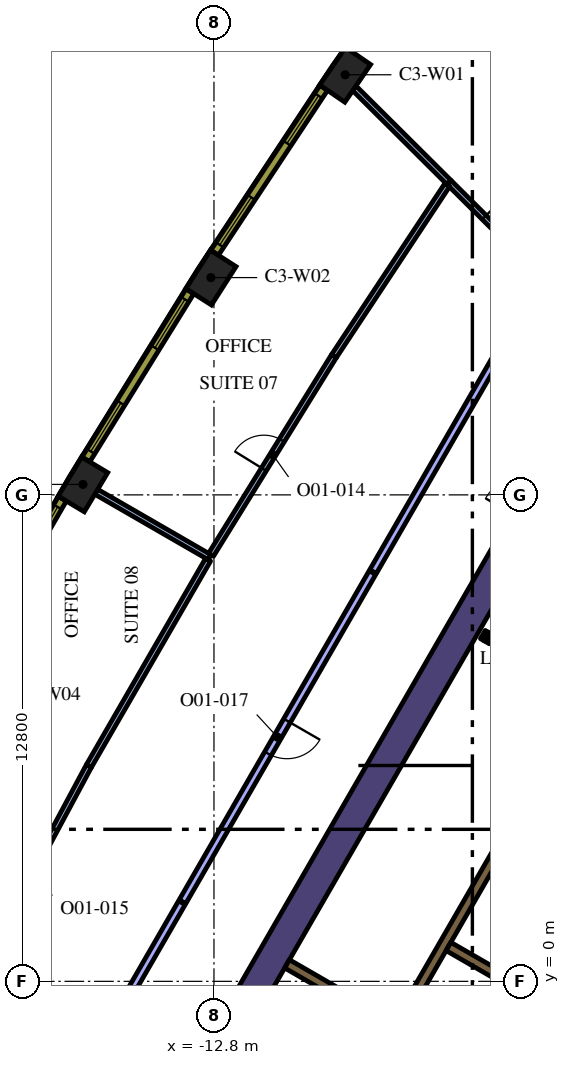
"""IFC4 building model, lengths in metres.
Left out: names, types, materials, properties, quantities, classifications, styles, units other than length and angle.
Written with IfcOpenShell. Run it as: python <this file> out.ifc"""

import sys

from ifc_helpers import new_model, si_unit, direction, frame, frame_2d, origin, origin_2d, place, context, subcontext, project, spatial, polyline, rectangle, outline, extrude, element, fill, save


model = new_model("IFC4")
c1 = context("Model", 3, precision=1e-05, world=origin(), true_north=direction((0.0, 1.0)))
c2 = subcontext(c1, "Body", "Model", "MODEL_VIEW")
j1 = project(units=[si_unit("LENGTHUNIT", "METRE"), si_unit("PLANEANGLEUNIT", "RADIAN")], contexts=[c1])
p1 = place(None, origin())
s1 = spatial("IfcSite", under=j1, at=p1, CompositionType="ELEMENT")
p2 = place(p1, origin())
s2 = spatial("IfcBuilding", under=s1, at=p2, CompositionType="ELEMENT")
p3 = place(p2, frame((0.0, 0.0, 150.0)))
s3 = spatial("IfcBuildingStorey", under=s2, at=p3, CompositionType="ELEMENT", Elevation=150.0)
for number, where, z_axis, x_axis in (
    (1, (-9.348, 23.854, 0.0), (0.0, 0.0, 1.0), (-0.565, -0.825, 0.0)),
    (2, (-12.88, 18.517, 0.0), (0.0, 0.0, 1.0), (-0.539, -0.842, 0.0)),
    (3, (-16.247, 13.075, 0.0), (0.0, 0.0, 1.0), (-0.513, -0.858, 0.0)),
):
    element("IfcColumn", number, at=place(p3, frame(where, z_axis=z_axis, x_axis=x_axis)), inside=s3, PredefinedType="COLUMN", context=c2, shape_type="SweptSolid", body=[
        extrude(rectangle(XDim=1.2, YDim=0.8, at=origin_2d()), origin(), (0.0, 0.0, 1.0), 4.2),
    ])
p4 = place(p3, frame((-12.668, -1.842, 0.0), z_axis=(0.0, 0.0, 1.0), x_axis=(0.500003640647, 0.866023301845, 0.0)))
e4 = element("IfcWall", 4, at=p4, inside=s3, PredefinedType="SOLIDWALL", context=c2, shape_type="SweptSolid", body=[
    extrude(rectangle(XDim=15.858, YDim=0.8, at=frame_2d((7.929, 0.0))), origin(), (0.0, 0.0, 1.0), 4.2),
])
p5 = place(p3, frame((-8.06, -1.311, 0.0), z_axis=(0.0, 0.0, 1.0), x_axis=(0.50000273126, 0.866023826885, 0.0)))
e5 = element("IfcWall", 5, at=p5, inside=s3, PredefinedType="SOLIDWALL", context=c2, shape_type="SweptSolid", body=[
    extrude(rectangle(XDim=10.33, YDim=0.25, at=frame_2d((5.165, 0.0))), origin(), (0.0, 0.0, 1.0), 4.2),
])
p6 = place(p3, frame((-4.724, -0.182, 0.0), z_axis=(0.0, 0.0, 1.0), x_axis=(-0.866008176907, 0.50002983664, 0.0)))
e6 = element("IfcWall", 6, at=p6, inside=s3, PredefinedType="SOLIDWALL", context=c2, shape_type="SweptSolid", body=[
    extrude(rectangle(XDim=2.2, YDim=0.25, at=frame_2d((1.1, 0.0))), origin(), (0.0, 0.0, 1.0), 4.2),
])
p7 = place(p3, frame((-8.106, -1.14, 0.0), z_axis=(0.0, 0.0, 1.0), x_axis=(-0.866008981251, 0.500028443584, 0.0)))
e7 = element("IfcWall", 7, at=p7, inside=s3, PredefinedType="SOLIDWALL", context=c2, shape_type="SweptSolid", body=[
    extrude(rectangle(XDim=3.2, YDim=0.25, at=frame_2d((1.6, 0.0))), origin(), (0.0, 0.0, 1.0), 4.2),
])
p8 = place(p3, frame((-5.725, 9.125, 0.0), z_axis=(0.0, 0.0, 1.0), x_axis=(0.866185586049, -0.49972245349, 0.0)))
e8 = element("IfcWall", 8, at=p8, inside=s3, PredefinedType="SOLIDWALL", context=c2, shape_type="SweptSolid", body=[
    extrude(rectangle(XDim=0.11, YDim=0.25, at=frame_2d((0.055, 0.0))), origin(), (0.0, 0.0, 1.0), 4.2),
])
p9 = place(p3, origin())
e9 = element("IfcWall", 9, at=p9, inside=s3, PredefinedType="SOLIDWALL", context=c2, shape_type="SweptSolid", body=[
    extrude(outline(polyline([(-5.689, 8.96), (-5.69, 8.961), (-5.565, 9.177), (-5.319, 9.035), (-5.335, 9.026), (-5.351, 9.015), (-5.366, 9.002), (-5.379, 8.988), (-5.392, 8.972), (-5.402, 8.956), (-5.412, 8.939), (-5.629, 9.064), (-5.629, 9.064), (-5.689, 8.96)])), origin(), (0.0, 0.0, 1.0), 4.2),
])
p10 = place(p3, frame((-0.898, 6.194, 0.0), z_axis=(0.0, 0.0, 1.0), x_axis=(-0.499996202215, -0.866027596426, 0.0)))
e10 = element("IfcWall", 10, at=p10, inside=s3, PredefinedType="SOLIDWALL", context=c2, shape_type="SweptSolid", body=[
    extrude(rectangle(XDim=9.83, YDim=0.25, at=frame_2d((4.915, 0.0))), origin(), (0.0, 0.0, 1.0), 4.2),
])
p11 = place(p10, frame((0.585, 0.0, 0.0)))
e11 = element("IfcOpeningElement", 11, at=p11, cuts=e10, PredefinedType="OPENING", context=c2, shape_type="SweptSolid", body=[
    extrude(rectangle(XDim=1.1, YDim=2.1, at=frame_2d((0.55, 1.05))), frame((0.0, 0.135, 0.0), z_axis=(0.0, -1.0, 0.0), x_axis=(1.0, 0.0, 0.0)), (0.0, 0.0, 1.0), 0.27),
])
p12 = place(p10, frame((3.105, 0.0, 0.0)))
e12 = element("IfcOpeningElement", 12, at=p12, cuts=e10, PredefinedType="OPENING", context=c2, shape_type="SweptSolid", body=[
    extrude(rectangle(XDim=1.1, YDim=2.1, at=frame_2d((0.55, 1.05))), frame((0.0, 0.135, 0.0), z_axis=(0.0, -1.0, 0.0), x_axis=(1.0, 0.0, 0.0)), (0.0, 0.0, 1.0), 0.27),
])
p13 = place(p10, frame((5.625, 0.0, 0.0)))
e13 = element("IfcOpeningElement", 13, at=p13, cuts=e10, PredefinedType="OPENING", context=c2, shape_type="SweptSolid", body=[
    extrude(rectangle(XDim=1.1, YDim=2.1, at=frame_2d((0.55, 1.05))), frame((0.0, 0.135, 0.0), z_axis=(0.0, -1.0, 0.0), x_axis=(1.0, 0.0, 0.0)), (0.0, 0.0, 1.0), 0.27),
])
p14 = place(p10, frame((8.145, 0.0, 0.0)))
e14 = element("IfcOpeningElement", 14, at=p14, cuts=e10, PredefinedType="OPENING", context=c2, shape_type="SweptSolid", body=[
    extrude(rectangle(XDim=1.1, YDim=2.1, at=frame_2d((0.55, 1.05))), frame((0.0, 0.135, 0.0), z_axis=(0.0, -1.0, 0.0), x_axis=(1.0, 0.0, 0.0)), (0.0, 0.0, 1.0), 0.27),
])
p15 = place(p3, frame((-5.659, 9.012, 0.0), z_axis=(0.0, 0.0, 1.0), x_axis=(0.866009402589, -0.500027713859, 0.0)))
e15 = element("IfcWall", 15, at=p15, inside=s3, PredefinedType="PARTITIONING", context=c2, shape_type="SweptSolid", body=[
    extrude(rectangle(XDim=2.1, YDim=0.12, at=frame_2d((1.05, 0.0))), origin(), (0.0, 0.0, 1.0), 3.15),
])
p16 = place(p15, frame((0.45, 0.0, 0.0)))
e16 = element("IfcOpeningElement", 16, at=p16, cuts=e15, PredefinedType="OPENING", context=c2, shape_type="SweptSolid", body=[
    extrude(rectangle(XDim=1.2, YDim=2.1, at=frame_2d((0.6, 1.05))), frame((0.0, 0.07, 0.0), z_axis=(0.0, -1.0, 0.0), x_axis=(1.0, 0.0, 0.0)), (0.0, 0.0, 1.0), 0.14),
])
p17 = place(p3, frame((-6.613, 21.021, 0.0), z_axis=(0.0, 0.0, 1.0), x_axis=(-0.709222036241, 0.704985179497, 0.0)))
e17 = element("IfcWall", 17, at=p17, inside=s3, PredefinedType="PARTITIONING", context=c2, shape_type="SweptSolid", body=[
    extrude(rectangle(XDim=3.515, YDim=0.15, at=frame_2d((1.757, 0.0))), origin(), (0.0, 0.0, 1.0), 3.15),
])
p18 = place(p3, frame((-6.619, 21.027, 0.0), z_axis=(0.0, 0.0, 1.0), x_axis=(0.709188943058, -0.705018470002, 0.0)))
e18 = element("IfcWall", 18, at=p18, inside=s3, PredefinedType="PARTITIONING", context=c2, shape_type="SweptSolid", body=[
    extrude(rectangle(XDim=3.512, YDim=0.15, at=frame_2d((1.756, 0.0))), origin(), (0.0, 0.0, 1.0), 3.15),
])
p19 = place(p18, frame((1.312, 0.0, 0.0)))
e19 = element("IfcOpeningElement", 19, at=p19, cuts=e18, PredefinedType="OPENING", context=c2, shape_type="SweptSolid", body=[
    extrude(rectangle(XDim=0.9, YDim=2.1, at=frame_2d((0.45, 1.05))), frame((0.0, 0.085, 0.0), z_axis=(0.0, -1.0, 0.0), x_axis=(1.0, 0.0, 0.0)), (0.0, 0.0, 1.0), 0.17),
])
p20 = place(p3, frame((-12.917, 11.16, 0.0), z_axis=(0.0, 0.0, 1.0), x_axis=(-0.866039125629, 0.499976232315, 0.0)))
e20 = element("IfcWall", 20, at=p20, inside=s3, PredefinedType="PARTITIONING", context=c2, shape_type="SweptSolid", body=[
    extrude(rectangle(XDim=3.442, YDim=0.15, at=frame_2d((1.721, 0.0))), origin(), (0.0, 0.0, 1.0), 3.15),
])
p21 = place(p3, frame((-6.658, 20.96, 0.0), z_axis=(0.0, 0.0, 1.0), x_axis=(-0.551907039463, -0.833905642019, 0.0)))
e21 = element("IfcWall", 21, at=p21, inside=s3, PredefinedType="PARTITIONING", context=c2, shape_type="SweptSolid", body=[
    extrude(rectangle(XDim=5.412, YDim=0.15, at=frame_2d((2.706, 0.0))), origin(), (0.0, 0.0, 1.0), 3.15),
])
p22 = place(p3, frame((-12.877, 11.224, 0.0), z_axis=(0.0, 0.0, 1.0), x_axis=(0.526202711334, 0.850359163286, 0.0)))
e22 = element("IfcWall", 22, at=p22, inside=s3, PredefinedType="PARTITIONING", context=c2, shape_type="SweptSolid", body=[
    extrude(rectangle(XDim=6.142, YDim=0.15, at=frame_2d((3.071, 0.0))), origin(), (0.0, 0.0, 1.0), 3.15),
])
p23 = place(p22, frame((2.642, 0.0, 0.0)))
e23 = element("IfcOpeningElement", 23, at=p23, cuts=e22, PredefinedType="OPENING", context=c2, shape_type="SweptSolid", body=[
    extrude(rectangle(XDim=0.9, YDim=2.1, at=frame_2d((0.45, 1.05))), frame((0.0, 0.085, 0.0), z_axis=(0.0, -1.0, 0.0), x_axis=(1.0, 0.0, 0.0)), (0.0, 0.0, 1.0), 0.17),
])
p24 = place(p3, frame((-12.954, 11.095, 0.0), z_axis=(0.0, 0.0, 1.0), x_axis=(-0.500282785331, -0.865862076027, 0.0)))
e24 = element("IfcWall", 24, at=p24, inside=s3, PredefinedType="PARTITIONING", context=c2, shape_type="SweptSolid", body=[
    extrude(rectangle(XDim=6.273, YDim=0.15, at=frame_2d((3.136, 0.0))), origin(), (0.0, 0.0, 1.0), 3.15),
])
p25 = place(p3, frame((-19.118, 0.02, 0.0), z_axis=(0.0, 0.0, 1.0), x_axis=(0.47251230182, 0.88132407469, 0.0)))
e25 = element("IfcWall", 25, at=p25, inside=s3, PredefinedType="PARTITIONING", context=c2, shape_type="SweptSolid", body=[
    extrude(rectangle(XDim=6.404, YDim=0.15, at=frame_2d((3.202, 0.0))), origin(), (0.0, 0.0, 1.0), 3.15),
])
p26 = place(p25, frame((2.704, 0.0, 0.0)))
e26 = element("IfcOpeningElement", 26, at=p26, cuts=e25, PredefinedType="OPENING", context=c2, shape_type="SweptSolid", body=[
    extrude(rectangle(XDim=0.9, YDim=2.1, at=frame_2d((0.45, 1.05))), frame((0.0, 0.085, 0.0), z_axis=(0.0, -1.0, 0.0), x_axis=(1.0, 0.0, 0.0)), (0.0, 0.0, 1.0), 0.17),
])
p27 = place(p3, frame((-8.628, 10.755, 0.0), z_axis=(0.0, 0.0, 1.0), x_axis=(-0.500004234368, -0.866022959057, 0.0)))
e27 = element("IfcWall", 27, at=p27, inside=s3, PredefinedType="PARTITIONING", context=c2, shape_type="SweptSolid", body=[
    extrude(rectangle(XDim=10.0, YDim=0.2, at=frame_2d((5.0, 0.0))), origin(), (0.0, 0.0, 1.0), 3.15),
])
p28 = place(p27, frame((4.5, 0.0, 0.0)))
e28 = element("IfcOpeningElement", 28, at=p28, cuts=e27, PredefinedType="OPENING", context=c2, shape_type="SweptSolid", body=[
    extrude(rectangle(XDim=1.0, YDim=2.1, at=frame_2d((0.5, 1.05))), frame((0.0, 0.11, 0.0), z_axis=(0.0, -1.0, 0.0), x_axis=(1.0, 0.0, 0.0)), (0.0, 0.0, 1.0), 0.22),
])
p29 = place(p3, frame((-13.643, 2.069, 0.0), z_axis=(0.0, 0.0, 1.0), x_axis=(-0.500012305324, -0.866018299186, 0.0)))
e29 = element("IfcWall", 29, at=p29, inside=s3, PredefinedType="PARTITIONING", context=c2, shape_type="SweptSolid", body=[
    extrude(rectangle(XDim=9.721, YDim=0.2, at=frame_2d((4.861, 0.0))), origin(), (0.0, 0.0, 1.0), 3.15),
])
p30 = place(p3, frame((-4.167, 18.483, 0.0), z_axis=(0.0, 0.0, 1.0), x_axis=(-0.499974340325, -0.866040217898, 0.0)))
e30 = element("IfcWall", 30, at=p30, inside=s3, PredefinedType="PARTITIONING", context=c2, shape_type="SweptSolid", body=[
    extrude(rectangle(XDim=8.894, YDim=0.2, at=frame_2d((4.447, 0.0))), origin(), (0.0, 0.0, 1.0), 3.15),
])
p31 = place(p3, frame((-6.223, 28.762, 0.0), z_axis=(0.0, 0.0, 1.0), x_axis=(-0.577115207679, -0.816662743772, 0.0)))
e31 = element("IfcWall", 31, at=p31, inside=s3, PredefinedType="SOLIDWALL", context=c2, shape_type="SweptSolid", body=[
    extrude(rectangle(XDim=5.213, YDim=0.24, at=frame_2d((2.606, 0.0))), origin(), (0.0, 0.0, 1.0), 3.95),
])
p32 = place(p31, frame((0.221, 0.0, 0.9)))
e32 = element("IfcOpeningElement", 32, at=p32, cuts=e31, PredefinedType="OPENING", context=c2, shape_type="SweptSolid", body=[
    extrude(rectangle(XDim=1.5, YDim=2.55, at=frame_2d((0.75, 1.275))), frame((0.0, 0.13, 0.0), z_axis=(0.0, -1.0, 0.0), x_axis=(1.0, 0.0, 0.0)), (0.0, 0.0, 1.0), 0.26),
])
p33 = place(p31, frame((3.452, 0.0, 0.9)))
e33 = element("IfcOpeningElement", 33, at=p33, cuts=e31, PredefinedType="OPENING", context=c2, shape_type="SweptSolid", body=[
    extrude(rectangle(XDim=1.5, YDim=2.55, at=frame_2d((0.75, 1.275))), frame((0.0, 0.13, 0.0), z_axis=(0.0, -1.0, 0.0), x_axis=(1.0, 0.0, 0.0)), (0.0, 0.0, 1.0), 0.26),
])
p34 = place(p3, frame((-9.911, 23.51, 0.0), z_axis=(0.0, 0.0, 1.0), x_axis=(-0.551892811511, -0.833915058386, 0.0)))
e34 = element("IfcWall", 34, at=p34, inside=s3, PredefinedType="SOLIDWALL", context=c2, shape_type="SweptSolid", body=[
    extrude(rectangle(XDim=5.204, YDim=0.24, at=frame_2d((2.602, 0.0))), origin(), (0.0, 0.0, 1.0), 3.95),
])
p35 = place(p34, frame((0.248, 0.0, 0.9)))
e35 = element("IfcOpeningElement", 35, at=p35, cuts=e34, PredefinedType="OPENING", context=c2, shape_type="SweptSolid", body=[
    extrude(rectangle(XDim=1.5, YDim=2.55, at=frame_2d((0.75, 1.275))), frame((0.0, 0.13, 0.0), z_axis=(0.0, -1.0, 0.0), x_axis=(1.0, 0.0, 0.0)), (0.0, 0.0, 1.0), 0.26),
])
p36 = place(p34, frame((3.455, 0.0, 0.9)))
e36 = element("IfcOpeningElement", 36, at=p36, cuts=e34, PredefinedType="OPENING", context=c2, shape_type="SweptSolid", body=[
    extrude(rectangle(XDim=1.5, YDim=2.55, at=frame_2d((0.75, 1.275))), frame((0.0, 0.13, 0.0), z_axis=(0.0, -1.0, 0.0), x_axis=(1.0, 0.0, 0.0)), (0.0, 0.0, 1.0), 0.26),
])
p37 = place(p3, frame((-13.433, 18.156, 0.0), z_axis=(0.0, 0.0, 1.0), x_axis=(-0.526197926587, -0.850362124072, 0.0)))
e37 = element("IfcWall", 37, at=p37, inside=s3, PredefinedType="SOLIDWALL", context=c2, shape_type="SweptSolid", body=[
    extrude(rectangle(XDim=5.203, YDim=0.24, at=frame_2d((2.602, 0.0))), origin(), (0.0, 0.0, 1.0), 3.95),
])
p38 = place(p37, frame((0.248, 0.0, 0.9)))
e38 = element("IfcOpeningElement", 38, at=p38, cuts=e37, PredefinedType="OPENING", context=c2, shape_type="SweptSolid", body=[
    extrude(rectangle(XDim=1.5, YDim=2.55, at=frame_2d((0.75, 1.275))), frame((0.0, 0.13, 0.0), z_axis=(0.0, -1.0, 0.0), x_axis=(1.0, 0.0, 0.0)), (0.0, 0.0, 1.0), 0.26),
])
p39 = place(p37, frame((3.455, 0.0, 0.9)))
e39 = element("IfcOpeningElement", 39, at=p39, cuts=e37, PredefinedType="OPENING", context=c2, shape_type="SweptSolid", body=[
    extrude(rectangle(XDim=1.5, YDim=2.55, at=frame_2d((0.75, 1.275))), frame((0.0, 0.13, 0.0), z_axis=(0.0, -1.0, 0.0), x_axis=(1.0, 0.0, 0.0)), (0.0, 0.0, 1.0), 0.26),
])
p40 = place(p3, frame((-16.789, 12.697, 0.0), z_axis=(0.0, 0.0, 1.0), x_axis=(-0.500009456303, -0.866019944116, 0.0)))
e40 = element("IfcWall", 40, at=p40, inside=s3, PredefinedType="SOLIDWALL", context=c2, shape_type="SweptSolid", body=[
    extrude(rectangle(XDim=5.204, YDim=0.24, at=frame_2d((2.602, 0.0))), origin(), (0.0, 0.0, 1.0), 3.95),
])
p41 = place(p40, frame((0.248, 0.0, 0.9)))
e41 = element("IfcOpeningElement", 41, at=p41, cuts=e40, PredefinedType="OPENING", context=c2, shape_type="SweptSolid", body=[
    extrude(rectangle(XDim=1.5, YDim=2.55, at=frame_2d((0.75, 1.275))), frame((0.0, 0.13, 0.0), z_axis=(0.0, -1.0, 0.0), x_axis=(1.0, 0.0, 0.0)), (0.0, 0.0, 1.0), 0.26),
])
p42 = place(p40, frame((3.455, 0.0, 0.9)))
e42 = element("IfcOpeningElement", 42, at=p42, cuts=e40, PredefinedType="OPENING", context=c2, shape_type="SweptSolid", body=[
    extrude(rectangle(XDim=1.5, YDim=2.55, at=frame_2d((0.75, 1.275))), frame((0.0, 0.13, 0.0), z_axis=(0.0, -1.0, 0.0), x_axis=(1.0, 0.0, 0.0)), (0.0, 0.0, 1.0), 0.26),
])
p43 = place(p19, origin())
e43 = element("IfcDoor", 43, at=p43, inside=s3, OperationType="SINGLE_SWING_RIGHT", PredefinedType="DOOR", context=c2, shape_type="SweptSolid", body=[
    extrude(rectangle(XDim=0.9, YDim=2.1, at=frame_2d((0.45, 1.05))), frame((0.0, 0.025, 0.0), z_axis=(0.0, -1.0, 0.0), x_axis=(1.0, 0.0, 0.0)), (0.0, 0.0, 1.0), 0.05),
])
fill(e19, e43)
p44 = place(p23, origin())
e44 = element("IfcDoor", 44, at=p44, inside=s3, OperationType="SINGLE_SWING_RIGHT", PredefinedType="DOOR", context=c2, shape_type="SweptSolid", body=[
    extrude(rectangle(XDim=0.9, YDim=2.1, at=frame_2d((0.45, 1.05))), frame((0.0, 0.025, 0.0), z_axis=(0.0, -1.0, 0.0), x_axis=(1.0, 0.0, 0.0)), (0.0, 0.0, 1.0), 0.05),
])
fill(e23, e44)
p45 = place(p28, origin())
e45 = element("IfcDoor", 45, at=p45, inside=s3, OperationType="SINGLE_SWING_LEFT", PredefinedType="DOOR", context=c2, shape_type="SweptSolid", body=[
    extrude(rectangle(XDim=1.0, YDim=2.1, at=frame_2d((0.5, 1.05))), frame((0.0, 0.025, 0.0), z_axis=(0.0, -1.0, 0.0), x_axis=(1.0, 0.0, 0.0)), (0.0, 0.0, 1.0), 0.05),
])
fill(e28, e45)
p46 = place(p35, origin())
e46 = element("IfcWindow", 46, at=p46, inside=s3, PartitioningType="SINGLE_PANEL", PredefinedType="WINDOW", context=c2, shape_type="SweptSolid", body=[
    extrude(rectangle(XDim=1.5, YDim=2.55, at=frame_2d((0.75, 1.275))), frame((0.0, 0.04, 0.0), z_axis=(0.0, -1.0, 0.0), x_axis=(1.0, 0.0, 0.0)), (0.0, 0.0, 1.0), 0.06),
])
fill(e35, e46)
p47 = place(p36, origin())
e47 = element("IfcWindow", 47, at=p47, inside=s3, PartitioningType="SINGLE_PANEL", PredefinedType="WINDOW", context=c2, shape_type="SweptSolid", body=[
    extrude(rectangle(XDim=1.5, YDim=2.55, at=frame_2d((0.75, 1.275))), frame((0.0, 0.04, 0.0), z_axis=(0.0, -1.0, 0.0), x_axis=(1.0, 0.0, 0.0)), (0.0, 0.0, 1.0), 0.06),
])
fill(e36, e47)
p48 = place(p38, origin())
e48 = element("IfcWindow", 48, at=p48, inside=s3, PartitioningType="SINGLE_PANEL", PredefinedType="WINDOW", context=c2, shape_type="SweptSolid", body=[
    extrude(rectangle(XDim=1.5, YDim=2.55, at=frame_2d((0.75, 1.275))), frame((0.0, 0.04, 0.0), z_axis=(0.0, -1.0, 0.0), x_axis=(1.0, 0.0, 0.0)), (0.0, 0.0, 1.0), 0.06),
])
fill(e38, e48)
p49 = place(p39, origin())
e49 = element("IfcWindow", 49, at=p49, inside=s3, PartitioningType="SINGLE_PANEL", PredefinedType="WINDOW", context=c2, shape_type="SweptSolid", body=[
    extrude(rectangle(XDim=1.5, YDim=2.55, at=frame_2d((0.75, 1.275))), frame((0.0, 0.04, 0.0), z_axis=(0.0, -1.0, 0.0), x_axis=(1.0, 0.0, 0.0)), (0.0, 0.0, 1.0), 0.06),
])
fill(e39, e49)
p50 = place(p41, origin())
e50 = element("IfcWindow", 50, at=p50, inside=s3, PartitioningType="SINGLE_PANEL", PredefinedType="WINDOW", context=c2, shape_type="SweptSolid", body=[
    extrude(rectangle(XDim=1.5, YDim=2.55, at=frame_2d((0.75, 1.275))), frame((0.0, 0.04, 0.0), z_axis=(0.0, -1.0, 0.0), x_axis=(1.0, 0.0, 0.0)), (0.0, 0.0, 1.0), 0.06),
])
fill(e41, e50)
save(model, sys.argv[1])
